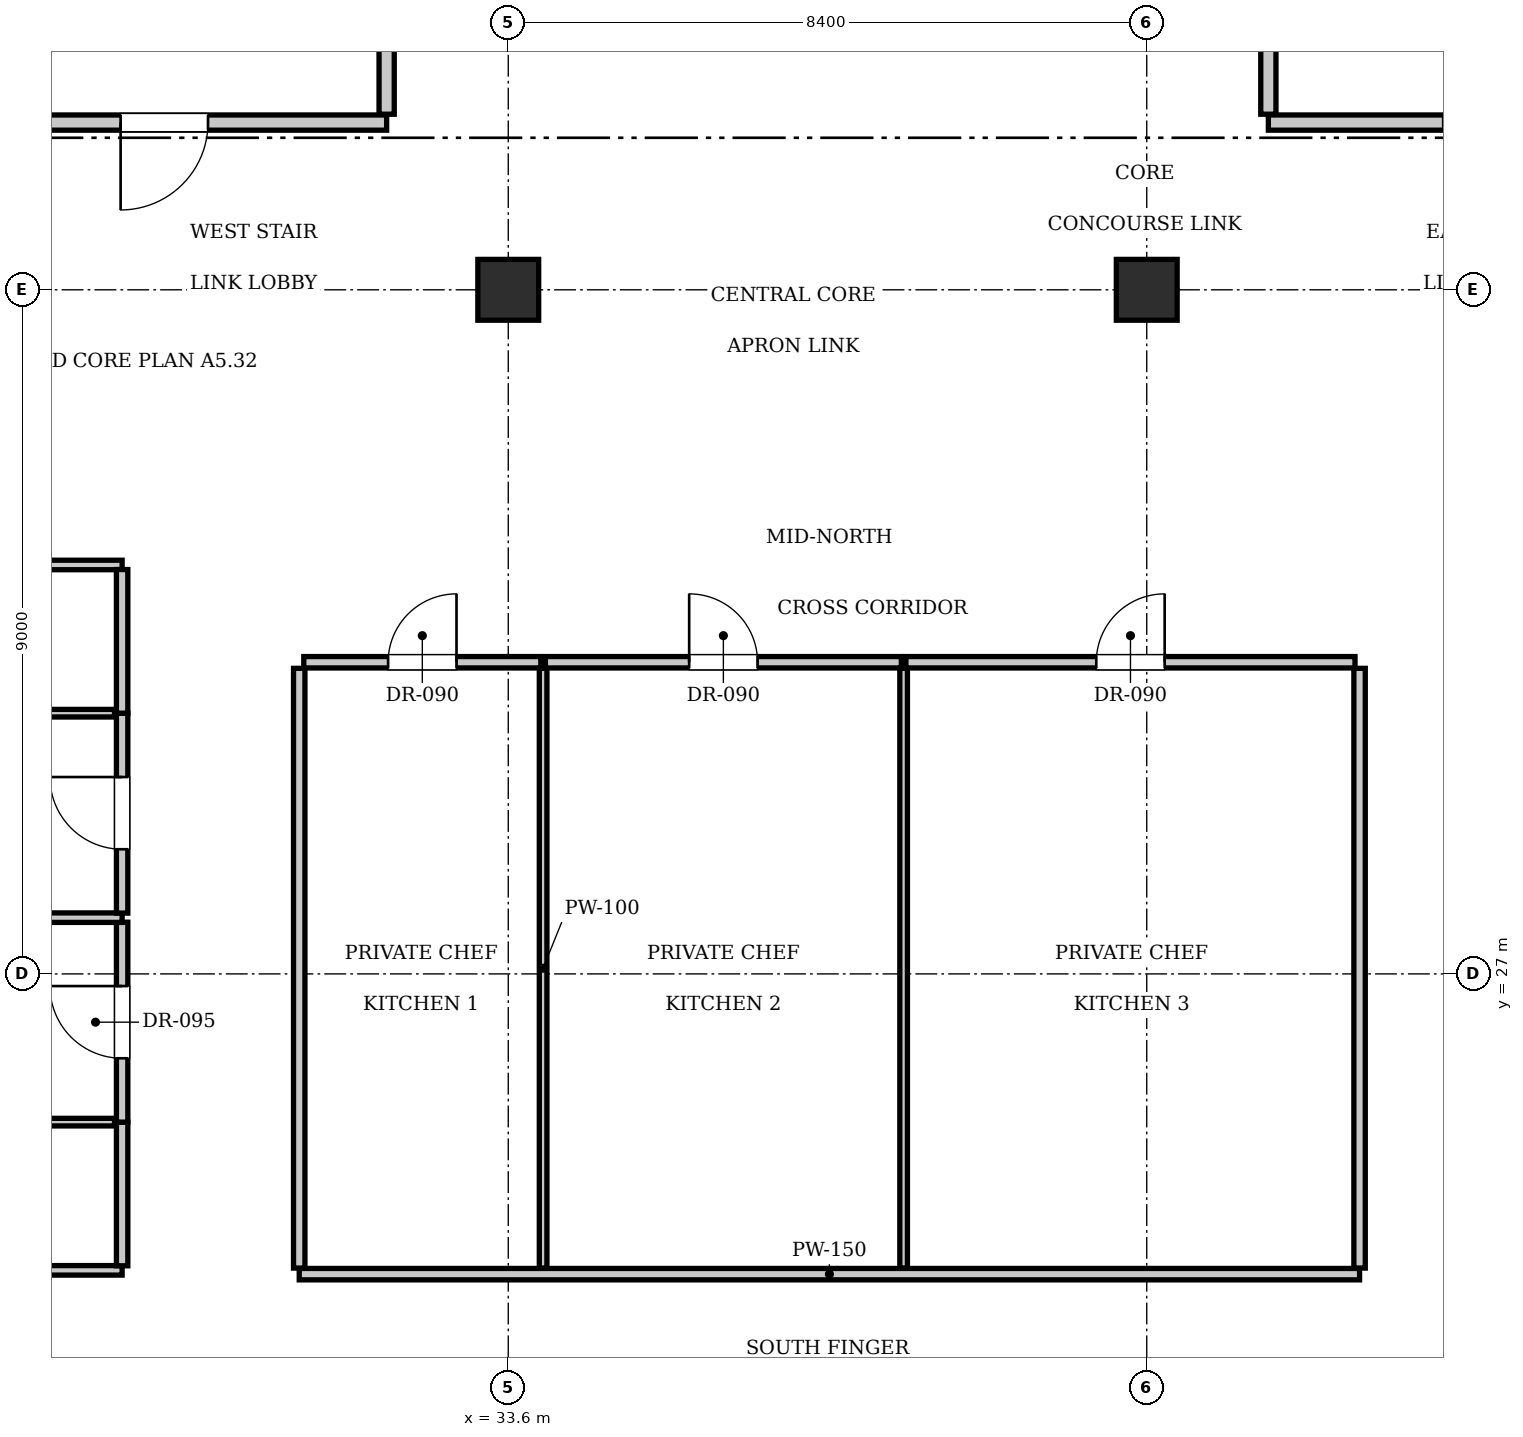
"""IFC4 building model, lengths in metres.
Left out: names, types, materials, properties, quantities, classifications, styles, units other than length and angle.
Written with IfcOpenShell. Run it as: python <this file> out.ifc"""

import sys

from ifc_helpers import new_model, si_unit, direction, frame, frame_2d, origin, origin_2d, place, context, subcontext, project, spatial, rectangle, extrude, element, fill, save


model = new_model("IFC4")
c1 = context("Model", 3, precision=1e-05, world=origin(), true_north=direction((0.0, 1.0)))
c2 = subcontext(c1, "Body", "Model", "MODEL_VIEW")
j1 = project(units=[si_unit("LENGTHUNIT", "METRE"), si_unit("PLANEANGLEUNIT", "RADIAN")], contexts=[c1])
p1 = place(None, origin())
s1 = spatial("IfcSite", under=j1, at=p1, CompositionType="ELEMENT")
p2 = place(p1, origin())
s2 = spatial("IfcBuilding", under=s1, at=p2, CompositionType="ELEMENT")
p3 = place(p2, frame((0.0, 0.0, 274.05)))
s3 = spatial("IfcBuildingStorey", under=s2, at=p3, CompositionType="ELEMENT", Elevation=274.05)
for number, where, z_axis, x_axis in (
    (1, (33.6, 36.0, 0.0), (0.0, 0.0, 1.0), (1.0, 0.0, 0.0)),
    (2, (42.0, 36.0, 0.0), (0.0, 0.0, 1.0), (1.0, 0.0, 0.0)),
):
    element("IfcColumn", number, at=place(p3, frame(where, z_axis=z_axis, x_axis=x_axis)), inside=s3, PredefinedType="COLUMN", context=c2, shape_type="SweptSolid", body=[
        extrude(rectangle(XDim=0.8, YDim=0.8, at=origin_2d()), origin(), (0.0, 0.0, 1.0), 3.85),
    ])
p4 = place(p3, frame((26.2, 38.2, 0.0), z_axis=(0.0, 0.0, 1.0), x_axis=(1.0, 0.0, 0.0)))
e3 = element("IfcWall", 3, at=p4, inside=s3, PredefinedType="PARTITIONING", context=c2, shape_type="SweptSolid", body=[
    extrude(rectangle(XDim=5.8, YDim=0.2, at=frame_2d((2.9, 0.0))), origin(), (0.0, 0.0, 1.0), 3.61),
])
p5 = place(p4, frame((2.3, 0.0, 0.0)))
e4 = element("IfcOpeningElement", 4, at=p5, cuts=e3, PredefinedType="OPENING", context=c2, shape_type="SweptSolid", body=[
    extrude(rectangle(XDim=1.15, YDim=2.15, at=frame_2d((0.575, 1.075))), frame((0.0, 0.11, 0.0), z_axis=(0.0, -1.0, 0.0), x_axis=(1.0, 0.0, 0.0)), (0.0, 0.0, 1.0), 0.22),
])
p6 = place(p3, frame((32.0, 38.31, 0.0), z_axis=(0.0, 0.0, 1.0), x_axis=(0.0, 1.0, 0.0)))
e5 = element("IfcWall", 5, at=p6, inside=s3, PredefinedType="PARTITIONING", context=c2, shape_type="SweptSolid", body=[
    extrude(rectangle(XDim=3.07, YDim=0.2, at=frame_2d((1.535, 0.0))), origin(), (0.0, 0.0, 1.0), 3.61),
])
p7 = place(p3, frame((43.6, 38.2, 0.0), z_axis=(0.0, 0.0, 1.0), x_axis=(1.0, 0.0, 0.0)))
e6 = element("IfcWall", 6, at=p7, inside=s3, PredefinedType="PARTITIONING", context=c2, shape_type="SweptSolid", body=[
    extrude(rectangle(XDim=5.8, YDim=0.2, at=frame_2d((2.9, 0.0))), origin(), (0.0, 0.0, 1.0), 3.61),
])
p8 = place(p7, frame((2.3, 0.0, 0.0)))
e7 = element("IfcOpeningElement", 7, at=p8, cuts=e6, PredefinedType="OPENING", context=c2, shape_type="SweptSolid", body=[
    extrude(rectangle(XDim=1.15, YDim=2.15, at=frame_2d((0.575, 1.075))), frame((0.0, 0.11, 0.0), z_axis=(0.0, -1.0, 0.0), x_axis=(1.0, 0.0, 0.0)), (0.0, 0.0, 1.0), 0.22),
])
p9 = place(p3, frame((43.6, 38.31, 0.0), z_axis=(0.0, 0.0, 1.0), x_axis=(0.0, 1.0, 0.0)))
e8 = element("IfcWall", 8, at=p9, inside=s3, PredefinedType="PARTITIONING", context=c2, shape_type="SweptSolid", body=[
    extrude(rectangle(XDim=3.07, YDim=0.2, at=frame_2d((1.535, 0.0))), origin(), (0.0, 0.0, 1.0), 3.61),
])
p10 = place(p3, frame((30.85, 23.05, 0.0), z_axis=(0.0, 0.0, 1.0), x_axis=(1.0, 0.0, 0.0)))
e9 = element("IfcWall", 9, at=p10, inside=s3, PredefinedType="PARTITIONING", context=c2, shape_type="SweptSolid", body=[
    extrude(rectangle(XDim=13.95, YDim=0.15, at=frame_2d((6.975, 0.0))), origin(), (0.0, 0.0, 1.0), 3.61),
])
for number, where, z_axis, x_axis in (
    (10, (30.85, 23.13, 0.0), (0.0, 0.0, 1.0), (0.0, 1.0, 0.0)),
    (11, (44.8, 23.13, 0.0), (0.0, 0.0, 1.0), (0.0, 1.0, 0.0)),
):
    element("IfcWall", number, at=place(p3, frame(where, z_axis=z_axis, x_axis=x_axis)), inside=s3, PredefinedType="PARTITIONING", context=c2, shape_type="SweptSolid", body=[
        extrude(rectangle(XDim=7.89, YDim=0.15, at=frame_2d((3.945, 0.0))), origin(), (0.0, 0.0, 1.0), 3.61),
    ])
p11 = place(p3, frame((30.91, 31.1, 0.0), z_axis=(0.0, 0.0, 1.0), x_axis=(1.0, 0.0, 0.0)))
e12 = element("IfcWall", 12, at=p11, inside=s3, PredefinedType="PARTITIONING", context=c2, shape_type="SweptSolid", body=[
    extrude(rectangle(XDim=3.119, YDim=0.15, at=frame_2d((1.559, 0.0))), origin(), (0.0, 0.0, 1.0), 3.61),
])
p12 = place(p11, frame((1.109, 0.0, 0.0)))
e13 = element("IfcOpeningElement", 13, at=p12, cuts=e12, PredefinedType="OPENING", context=c2, shape_type="SweptSolid", body=[
    extrude(rectangle(XDim=0.9, YDim=2.1, at=frame_2d((0.45, 1.05))), frame((0.0, 0.085, 0.0), z_axis=(0.0, -1.0, 0.0), x_axis=(1.0, 0.0, 0.0)), (0.0, 0.0, 1.0), 0.17),
])
p13 = place(p3, frame((34.059, 23.13, 0.0), z_axis=(0.0, 0.0, 1.0), x_axis=(0.0, 1.0, 0.0)))
e14 = element("IfcWall", 14, at=p13, inside=s3, PredefinedType="PARTITIONING", context=c2, shape_type="SweptSolid", body=[
    extrude(rectangle(XDim=7.89, YDim=0.1, at=frame_2d((3.945, 0.0))), origin(), (0.0, 0.0, 1.0), 3.61),
])
p14 = place(p3, frame((34.088, 31.1, 0.0), z_axis=(0.0, 0.0, 1.0), x_axis=(1.0, 0.0, 0.0)))
e15 = element("IfcWall", 15, at=p14, inside=s3, PredefinedType="PARTITIONING", context=c2, shape_type="SweptSolid", body=[
    extrude(rectangle(XDim=4.683, YDim=0.15, at=frame_2d((2.342, 0.0))), origin(), (0.0, 0.0, 1.0), 3.61),
])
p15 = place(p14, frame((1.892, 0.0, 0.0)))
e16 = element("IfcOpeningElement", 16, at=p15, cuts=e15, PredefinedType="OPENING", context=c2, shape_type="SweptSolid", body=[
    extrude(rectangle(XDim=0.9, YDim=2.1, at=frame_2d((0.45, 1.05))), frame((0.0, 0.085, 0.0), z_axis=(0.0, -1.0, 0.0), x_axis=(1.0, 0.0, 0.0)), (0.0, 0.0, 1.0), 0.17),
])
p16 = place(p3, frame((38.802, 23.13, 0.0), z_axis=(0.0, 0.0, 1.0), x_axis=(0.0, 1.0, 0.0)))
e17 = element("IfcWall", 17, at=p16, inside=s3, PredefinedType="PARTITIONING", context=c2, shape_type="SweptSolid", body=[
    extrude(rectangle(XDim=7.89, YDim=0.1, at=frame_2d((3.945, 0.0))), origin(), (0.0, 0.0, 1.0), 3.61),
])
p17 = place(p3, frame((38.832, 31.1, 0.0), z_axis=(0.0, 0.0, 1.0), x_axis=(1.0, 0.0, 0.0)))
e18 = element("IfcWall", 18, at=p17, inside=s3, PredefinedType="PARTITIONING", context=c2, shape_type="SweptSolid", body=[
    extrude(rectangle(XDim=5.908, YDim=0.15, at=frame_2d((2.954, 0.0))), origin(), (0.0, 0.0, 1.0), 3.61),
])
p18 = place(p17, frame((2.504, 0.0, 0.0)))
e19 = element("IfcOpeningElement", 19, at=p18, cuts=e18, PredefinedType="OPENING", context=c2, shape_type="SweptSolid", body=[
    extrude(rectangle(XDim=0.9, YDim=2.1, at=frame_2d((0.45, 1.05))), frame((0.0, 0.085, 0.0), z_axis=(0.0, -1.0, 0.0), x_axis=(1.0, 0.0, 0.0)), (0.0, 0.0, 1.0), 0.17),
])
for number, where, z_axis, x_axis in (
    (20, (15.5, 23.1, 0.0), (0.0, 0.0, 1.0), (1.0, 0.0, 0.0)),
    (21, (15.5, 32.38, 0.0), (0.0, 0.0, 1.0), (1.0, 0.0, 0.0)),
):
    element("IfcWall", number, at=place(p3, frame(where, z_axis=z_axis, x_axis=x_axis)), inside=s3, PredefinedType="PARTITIONING", context=c2, shape_type="SweptSolid", body=[
        extrude(rectangle(XDim=13.02, YDim=0.125, at=frame_2d((6.51, 0.0))), origin(), (0.0, 0.0, 1.0), 3.61),
    ])
p19 = place(p3, frame((28.52, 23.16, 0.0), z_axis=(0.0, 0.0, 1.0), x_axis=(0.0, 1.0, 0.0)))
e22 = element("IfcWall", 22, at=p19, inside=s3, PredefinedType="PARTITIONING", context=c2, shape_type="SweptSolid", body=[
    extrude(rectangle(XDim=1.89, YDim=0.15, at=frame_2d((0.945, 0.0))), origin(), (0.0, 0.0, 1.0), 3.61),
])
p20 = place(p3, frame((28.52, 25.05, 0.0), z_axis=(0.0, 0.0, 1.0), x_axis=(0.0, 1.0, 0.0)))
e23 = element("IfcWall", 23, at=p20, inside=s3, PredefinedType="PARTITIONING", context=c2, shape_type="SweptSolid", body=[
    extrude(rectangle(XDim=2.63, YDim=0.15, at=frame_2d((1.315, 0.0))), origin(), (0.0, 0.0, 1.0), 3.61),
])
p21 = place(p20, frame((0.84, 0.0, 0.0)))
e24 = element("IfcOpeningElement", 24, at=p21, cuts=e23, PredefinedType="OPENING", context=c2, shape_type="SweptSolid", body=[
    extrude(rectangle(XDim=0.95, YDim=2.15, at=frame_2d((0.475, 1.075))), frame((0.0, 0.085, 0.0), z_axis=(0.0, -1.0, 0.0), x_axis=(1.0, 0.0, 0.0)), (0.0, 0.0, 1.0), 0.17),
])
p22 = place(p3, frame((26.12, 25.05, 0.0), z_axis=(0.0, 0.0, 1.0), x_axis=(1.0, 0.0, 0.0)))
e25 = element("IfcWall", 25, at=p22, inside=s3, PredefinedType="PARTITIONING", context=c2, shape_type="SweptSolid", body=[
    extrude(rectangle(XDim=2.3, YDim=0.1, at=frame_2d((1.15, 0.0))), origin(), (0.0, 0.0, 1.0), 3.61),
])
p23 = place(p22, frame((0.35, 0.0, 0.0)))
e26 = element("IfcOpeningElement", 26, at=p23, cuts=e25, PredefinedType="OPENING", context=c2, shape_type="SweptSolid", body=[
    extrude(rectangle(XDim=0.85, YDim=2.1, at=frame_2d((0.425, 1.05))), frame((0.0, 0.06, 0.0), z_axis=(0.0, -1.0, 0.0), x_axis=(1.0, 0.0, 0.0)), (0.0, 0.0, 1.0), 0.12),
])
p24 = place(p3, frame((15.5, 27.74, 0.0), z_axis=(0.0, 0.0, 1.0), x_axis=(1.0, 0.0, 0.0)))
e27 = element("IfcWall", 27, at=p24, inside=s3, PredefinedType="PARTITIONING", context=c2, shape_type="SweptSolid", body=[
    extrude(rectangle(XDim=13.02, YDim=0.125, at=frame_2d((6.51, 0.0))), origin(), (0.0, 0.0, 1.0), 3.61),
])
p25 = place(p3, frame((28.52, 27.8, 0.0), z_axis=(0.0, 0.0, 1.0), x_axis=(0.0, 1.0, 0.0)))
e28 = element("IfcWall", 28, at=p25, inside=s3, PredefinedType="PARTITIONING", context=c2, shape_type="SweptSolid", body=[
    extrude(rectangle(XDim=2.63, YDim=0.15, at=frame_2d((1.315, 0.0))), origin(), (0.0, 0.0, 1.0), 3.61),
])
p26 = place(p25, frame((0.84, 0.0, 0.0)))
e29 = element("IfcOpeningElement", 29, at=p26, cuts=e28, PredefinedType="OPENING", context=c2, shape_type="SweptSolid", body=[
    extrude(rectangle(XDim=0.95, YDim=2.15, at=frame_2d((0.475, 1.075))), frame((0.0, 0.085, 0.0), z_axis=(0.0, -1.0, 0.0), x_axis=(1.0, 0.0, 0.0)), (0.0, 0.0, 1.0), 0.17),
])
p27 = place(p3, frame((28.52, 30.43, 0.0), z_axis=(0.0, 0.0, 1.0), x_axis=(0.0, 1.0, 0.0)))
e30 = element("IfcWall", 30, at=p27, inside=s3, PredefinedType="PARTITIONING", context=c2, shape_type="SweptSolid", body=[
    extrude(rectangle(XDim=1.89, YDim=0.15, at=frame_2d((0.945, 0.0))), origin(), (0.0, 0.0, 1.0), 3.61),
])
p28 = place(p3, frame((26.12, 30.43, 0.0), z_axis=(0.0, 0.0, 1.0), x_axis=(1.0, 0.0, 0.0)))
e31 = element("IfcWall", 31, at=p28, inside=s3, PredefinedType="PARTITIONING", context=c2, shape_type="SweptSolid", body=[
    extrude(rectangle(XDim=2.3, YDim=0.1, at=frame_2d((1.15, 0.0))), origin(), (0.0, 0.0, 1.0), 3.61),
])
p29 = place(p28, frame((0.35, 0.0, 0.0)))
e32 = element("IfcOpeningElement", 32, at=p29, cuts=e31, PredefinedType="OPENING", context=c2, shape_type="SweptSolid", body=[
    extrude(rectangle(XDim=0.85, YDim=2.1, at=frame_2d((0.425, 1.05))), frame((0.0, 0.06, 0.0), z_axis=(0.0, -1.0, 0.0), x_axis=(1.0, 0.0, 0.0)), (0.0, 0.0, 1.0), 0.12),
])
p30 = place(p5, frame((1.15, 0.0, 0.0), z_axis=(0.0, 0.0, 1.0), x_axis=(-1.0, 0.0, 0.0)))
e33 = element("IfcDoor", 33, at=p30, inside=s3, OperationType="SINGLE_SWING_RIGHT", PredefinedType="DOOR", context=c2, shape_type="SweptSolid", body=[
    extrude(rectangle(XDim=1.15, YDim=2.15, at=frame_2d((0.575, 1.075))), frame((0.0, 0.025, 0.0), z_axis=(0.0, -1.0, 0.0), x_axis=(1.0, 0.0, 0.0)), (0.0, 0.0, 1.0), 0.05),
])
fill(e4, e33)
p31 = place(p12, origin())
e34 = element("IfcDoor", 34, at=p31, inside=s3, OperationType="SINGLE_SWING_RIGHT", PredefinedType="DOOR", context=c2, shape_type="SweptSolid", body=[
    extrude(rectangle(XDim=0.9, YDim=2.1, at=frame_2d((0.45, 1.05))), frame((0.0, 0.025, 0.0), z_axis=(0.0, -1.0, 0.0), x_axis=(1.0, 0.0, 0.0)), (0.0, 0.0, 1.0), 0.05),
])
fill(e13, e34)
p32 = place(p15, origin())
e35 = element("IfcDoor", 35, at=p32, inside=s3, OperationType="SINGLE_SWING_LEFT", PredefinedType="DOOR", context=c2, shape_type="SweptSolid", body=[
    extrude(rectangle(XDim=0.9, YDim=2.1, at=frame_2d((0.45, 1.05))), frame((0.0, 0.025, 0.0), z_axis=(0.0, -1.0, 0.0), x_axis=(1.0, 0.0, 0.0)), (0.0, 0.0, 1.0), 0.05),
])
fill(e16, e35)
p33 = place(p18, origin())
e36 = element("IfcDoor", 36, at=p33, inside=s3, OperationType="SINGLE_SWING_RIGHT", PredefinedType="DOOR", context=c2, shape_type="SweptSolid", body=[
    extrude(rectangle(XDim=0.9, YDim=2.1, at=frame_2d((0.45, 1.05))), frame((0.0, 0.025, 0.0), z_axis=(0.0, -1.0, 0.0), x_axis=(1.0, 0.0, 0.0)), (0.0, 0.0, 1.0), 0.05),
])
fill(e19, e36)
p34 = place(p21, origin())
e37 = element("IfcDoor", 37, at=p34, inside=s3, OperationType="SINGLE_SWING_RIGHT", PredefinedType="DOOR", context=c2, shape_type="SweptSolid", body=[
    extrude(rectangle(XDim=0.95, YDim=2.15, at=frame_2d((0.475, 1.075))), frame((0.0, 0.025, 0.0), z_axis=(0.0, -1.0, 0.0), x_axis=(1.0, 0.0, 0.0)), (0.0, 0.0, 1.0), 0.05),
])
fill(e24, e37)
p35 = place(p26, origin())
e38 = element("IfcDoor", 38, at=p35, inside=s3, OperationType="SINGLE_SWING_RIGHT", PredefinedType="DOOR", context=c2, shape_type="SweptSolid", body=[
    extrude(rectangle(XDim=0.95, YDim=2.15, at=frame_2d((0.475, 1.075))), frame((0.0, 0.025, 0.0), z_axis=(0.0, -1.0, 0.0), x_axis=(1.0, 0.0, 0.0)), (0.0, 0.0, 1.0), 0.05),
])
fill(e29, e38)
save(model, sys.argv[1])
